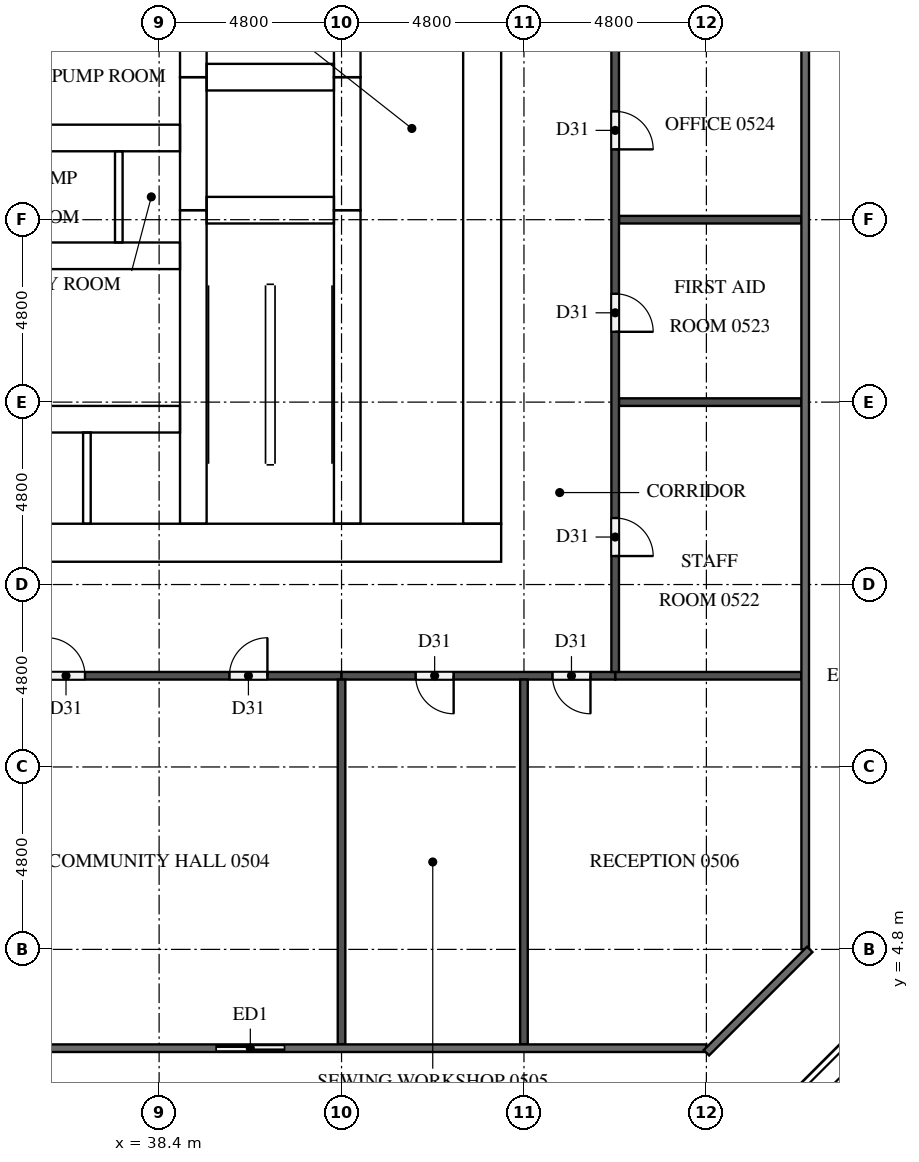
"""IFC4 building model, lengths in metres.
Left out: names, types, materials, properties, quantities, classifications, styles, units other than length and angle.
Written with IfcOpenShell. Run it as: python <this file> out.ifc"""

import sys

from ifc_helpers import new_model, si_unit, direction, frame, frame_2d, origin, place, context, subcontext, project, spatial, rectangle, extrude, element, fill, save


model = new_model("IFC4")
c1 = context("Model", 3, precision=1e-05, world=origin(), true_north=direction((0.0, 1.0)))
c2 = subcontext(c1, "Body", "Model", "MODEL_VIEW")
j1 = project(units=[si_unit("LENGTHUNIT", "METRE"), si_unit("PLANEANGLEUNIT", "RADIAN")], contexts=[c1])
p1 = place(None, origin())
s1 = spatial("IfcSite", under=j1, at=p1, CompositionType="ELEMENT")
p2 = place(p1, origin())
s2 = spatial("IfcBuilding", under=s1, at=p2, CompositionType="ELEMENT")
p3 = place(p2, frame((0.0, 0.0, 24.0)))
s3 = spatial("IfcBuildingStorey", under=s2, at=p3, CompositionType="ELEMENT", Elevation=24.0)
p4 = place(p3, frame((15.0, 15.5, 0.0), z_axis=(0.0, 0.0, 1.0), x_axis=(1.0, 0.0, 0.0)))
e1 = element("IfcWall", 1, at=p4, inside=s3, PredefinedType="SHEAR", context=c2, shape_type="SweptSolid", body=[
    extrude(rectangle(XDim=32.4, YDim=1.0, at=frame_2d((16.2, 0.0))), origin(), (0.0, 0.0, 1.0), 5.1),
])
p5 = place(p4, frame((15.3, 0.0, 0.0)))
e2 = element("IfcOpeningElement", 2, at=p5, cuts=e1, PredefinedType="OPENING", context=c2, shape_type="SweptSolid", body=[
    extrude(rectangle(XDim=1.8, YDim=2.1, at=frame_2d((0.9, 1.05))), frame((0.0, 0.51, 0.0), z_axis=(0.0, -1.0, 0.0), x_axis=(1.0, 0.0, 0.0)), (0.0, 0.0, 1.0), 1.02),
])
p6 = place(p3, frame((46.9, 16.0, 0.0), z_axis=(0.0, 0.0, 1.0), x_axis=(0.0, 1.0, 0.0)))
e3 = element("IfcWall", 3, at=p6, inside=s3, PredefinedType="SHEAR", context=c2, shape_type="SweptSolid", body=[
    extrude(rectangle(XDim=20.8, YDim=1.0, at=frame_2d((10.4, 0.0))), origin(), (0.0, 0.0, 1.0), 5.1),
])
p7 = place(p6, frame((10.1, 0.0, 0.0)))
e4 = element("IfcOpeningElement", 4, at=p7, cuts=e3, PredefinedType="OPENING", context=c2, shape_type="SweptSolid", body=[
    extrude(rectangle(XDim=1.2, YDim=2.1, at=frame_2d((0.6, 1.05))), frame((0.0, 0.51, 0.0), z_axis=(0.0, -1.0, 0.0), x_axis=(1.0, 0.0, 0.0)), (0.0, 0.0, 1.0), 1.02),
])
p8 = place(p3, frame((39.3, 16.0, 0.0), z_axis=(0.0, 0.0, 1.0), x_axis=(0.0, 1.0, 0.0)))
e5 = element("IfcWall", 5, at=p8, inside=s3, PredefinedType="SHEAR", context=c2, shape_type="SweptSolid", body=[
    extrude(rectangle(XDim=8.25, YDim=0.7, at=frame_2d((4.125, 0.0))), origin(), (0.0, 0.0, 1.0), 5.1),
])
p9 = place(p3, frame((39.3, 24.25, 0.0), z_axis=(0.0, 0.0, 1.0), x_axis=(0.0, 1.0, 0.0)))
e6 = element("IfcWall", 6, at=p9, inside=s3, PredefinedType="SHEAR", context=c2, shape_type="SweptSolid", body=[
    extrude(rectangle(XDim=3.5, YDim=0.7, at=frame_2d((1.75, 0.0))), origin(), (0.0, 0.0, 1.0), 5.1),
])
p10 = place(p3, frame((39.3, 27.75, 0.0), z_axis=(0.0, 0.0, 1.0), x_axis=(0.0, 1.0, 0.0)))
e7 = element("IfcWall", 7, at=p10, inside=s3, PredefinedType="SHEAR", context=c2, shape_type="SweptSolid", body=[
    extrude(rectangle(XDim=9.05, YDim=0.7, at=frame_2d((4.525, 0.0))), origin(), (0.0, 0.0, 1.0), 5.1),
])
p11 = place(p3, frame((43.35, 16.0, 0.0), z_axis=(0.0, 0.0, 1.0), x_axis=(0.0, 1.0, 0.0)))
e8 = element("IfcWall", 8, at=p11, inside=s3, PredefinedType="SHEAR", context=c2, shape_type="SweptSolid", body=[
    extrude(rectangle(XDim=8.25, YDim=0.7, at=frame_2d((4.125, 0.0))), origin(), (0.0, 0.0, 1.0), 5.1),
])
p12 = place(p11, frame((0.2, 0.0, 0.0)))
e9 = element("IfcOpeningElement", 9, at=p12, cuts=e8, PredefinedType="OPENING", context=c2, shape_type="SweptSolid", body=[
    extrude(rectangle(XDim=1.2, YDim=2.1, at=frame_2d((0.6, 1.05))), frame((0.0, 0.36, 0.0), z_axis=(0.0, -1.0, 0.0), x_axis=(1.0, 0.0, 0.0)), (0.0, 0.0, 1.0), 0.72),
])
p13 = place(p3, frame((43.35, 24.25, 0.0), z_axis=(0.0, 0.0, 1.0), x_axis=(0.0, 1.0, 0.0)))
e10 = element("IfcWall", 10, at=p13, inside=s3, PredefinedType="SHEAR", context=c2, shape_type="SweptSolid", body=[
    extrude(rectangle(XDim=3.5, YDim=0.7, at=frame_2d((1.75, 0.0))), origin(), (0.0, 0.0, 1.0), 5.1),
])
p14 = place(p13, frame((1.2, 0.0, 0.0)))
e11 = element("IfcOpeningElement", 11, at=p14, cuts=e10, PredefinedType="OPENING", context=c2, shape_type="SweptSolid", body=[
    extrude(rectangle(XDim=1.1, YDim=2.1, at=frame_2d((0.55, 1.05))), frame((0.0, 0.36, 0.0), z_axis=(0.0, -1.0, 0.0), x_axis=(1.0, 0.0, 0.0)), (0.0, 0.0, 1.0), 0.72),
])
p15 = place(p3, frame((43.35, 27.75, 0.0), z_axis=(0.0, 0.0, 1.0), x_axis=(0.0, 1.0, 0.0)))
e12 = element("IfcWall", 12, at=p15, inside=s3, PredefinedType="SHEAR", context=c2, shape_type="SweptSolid", body=[
    extrude(rectangle(XDim=9.05, YDim=0.7, at=frame_2d((4.525, 0.0))), origin(), (0.0, 0.0, 1.0), 5.1),
])
p16 = place(p15, frame((7.65, 0.0, 0.0)))
e13 = element("IfcOpeningElement", 13, at=p16, cuts=e12, PredefinedType="OPENING", context=c2, shape_type="SweptSolid", body=[
    extrude(rectangle(XDim=1.2, YDim=2.1, at=frame_2d((0.6, 1.05))), frame((0.0, 0.36, 0.0), z_axis=(0.0, -1.0, 0.0), x_axis=(1.0, 0.0, 0.0)), (0.0, 0.0, 1.0), 0.72),
])
for number, where, z_axis, x_axis in (
    (14, (39.65, 24.25, 0.0), (0.0, 0.0, 1.0), (1.0, 0.0, 0.0)),
    (15, (39.65, 27.75, 0.0), (0.0, 0.0, 1.0), (1.0, 0.0, 0.0)),
):
    element("IfcWall", number, at=place(p3, frame(where, z_axis=z_axis, x_axis=x_axis)), inside=s3, PredefinedType="SHEAR", context=c2, shape_type="SweptSolid", body=[
        extrude(rectangle(XDim=3.35, YDim=0.7, at=frame_2d((1.675, 0.0))), origin(), (0.0, 0.0, 1.0), 5.1),
    ])
p17 = place(p3, frame((33.35, 18.75, 0.0), z_axis=(0.0, 0.0, 1.0), x_axis=(1.0, 0.0, 0.0)))
e16 = element("IfcWall", 16, at=p17, inside=s3, PredefinedType="SHEAR", context=c2, shape_type="SweptSolid", body=[
    extrude(rectangle(XDim=5.6, YDim=0.7, at=frame_2d((2.8, 0.0))), origin(), (0.0, 0.0, 1.0), 5.1),
])
p18 = place(p17, frame((1.325, 0.0, 0.0)))
e17 = element("IfcOpeningElement", 17, at=p18, cuts=e16, PredefinedType="OPENING", context=c2, shape_type="SweptSolid", body=[
    extrude(rectangle(XDim=1.1, YDim=2.1, at=frame_2d((0.55, 1.05))), frame((0.0, 0.36, 0.0), z_axis=(0.0, -1.0, 0.0), x_axis=(1.0, 0.0, 0.0)), (0.0, 0.0, 1.0), 0.72),
])
p19 = place(p17, frame((3.875, 0.0, 0.0)))
e18 = element("IfcOpeningElement", 18, at=p19, cuts=e16, PredefinedType="OPENING", context=c2, shape_type="SweptSolid", body=[
    extrude(rectangle(XDim=1.1, YDim=2.1, at=frame_2d((0.55, 1.05))), frame((0.0, 0.36, 0.0), z_axis=(0.0, -1.0, 0.0), x_axis=(1.0, 0.0, 0.0)), (0.0, 0.0, 1.0), 0.72),
])
p20 = place(p3, frame((23.45, 23.05, 0.0), z_axis=(0.0, 0.0, 1.0), x_axis=(1.0, 0.0, 0.0)))
e19 = element("IfcWall", 19, at=p20, inside=s3, PredefinedType="SHEAR", context=c2, shape_type="SweptSolid", body=[
    extrude(rectangle(XDim=15.5, YDim=0.7, at=frame_2d((7.75, 0.0))), origin(), (0.0, 0.0, 1.0), 5.1),
])
p21 = place(p20, frame((0.658, 0.0, 0.0)))
e20 = element("IfcOpeningElement", 20, at=p21, cuts=e19, PredefinedType="OPENING", context=c2, shape_type="SweptSolid", body=[
    extrude(rectangle(XDim=1.1, YDim=2.1, at=frame_2d((0.55, 1.05))), frame((0.0, 0.36, 0.0), z_axis=(0.0, -1.0, 0.0), x_axis=(1.0, 0.0, 0.0)), (0.0, 0.0, 1.0), 0.72),
])
p22 = place(p20, frame((3.275, 0.0, 0.0)))
e21 = element("IfcOpeningElement", 21, at=p22, cuts=e19, PredefinedType="OPENING", context=c2, shape_type="SweptSolid", body=[
    extrude(rectangle(XDim=1.1, YDim=2.1, at=frame_2d((0.55, 1.05))), frame((0.0, 0.36, 0.0), z_axis=(0.0, -1.0, 0.0), x_axis=(1.0, 0.0, 0.0)), (0.0, 0.0, 1.0), 0.72),
])
p23 = place(p20, frame((11.628, 0.0, 0.0)))
e22 = element("IfcOpeningElement", 22, at=p23, cuts=e19, PredefinedType="OPENING", context=c2, shape_type="SweptSolid", body=[
    extrude(rectangle(XDim=1.0, YDim=2.1, at=frame_2d((0.5, 1.05))), frame((0.0, 0.36, 0.0), z_axis=(0.0, -1.0, 0.0), x_axis=(1.0, 0.0, 0.0)), (0.0, 0.0, 1.0), 0.72),
])
p24 = place(p20, frame((14.245, 0.0, 0.0)))
e23 = element("IfcOpeningElement", 23, at=p24, cuts=e19, PredefinedType="OPENING", context=c2, shape_type="SweptSolid", body=[
    extrude(rectangle(XDim=1.0, YDim=2.1, at=frame_2d((0.5, 1.05))), frame((0.0, 0.36, 0.0), z_axis=(0.0, -1.0, 0.0), x_axis=(1.0, 0.0, 0.0)), (0.0, 0.0, 1.0), 0.72),
])
p25 = place(p3, frame((23.45, 26.15, 0.0), z_axis=(0.0, 0.0, 1.0), x_axis=(1.0, 0.0, 0.0)))
e24 = element("IfcWall", 24, at=p25, inside=s3, PredefinedType="SHEAR", context=c2, shape_type="SweptSolid", body=[
    extrude(rectangle(XDim=15.5, YDim=0.7, at=frame_2d((7.75, 0.0))), origin(), (0.0, 0.0, 1.0), 5.1),
])
p26 = place(p3, frame((39.6, 2.2, 0.0), z_axis=(0.0, 0.0, 1.0), x_axis=(1.0, 0.0, 0.0)))
e25 = element("IfcWall", 25, at=p26, inside=s3, PredefinedType="SOLIDWALL", context=c2, shape_type="SweptSolid", body=[
    extrude(rectangle(XDim=2.4, YDim=0.15, at=frame_2d((1.2, 0.0))), origin(), (0.0, 0.0, 1.0), 5.1),
])
p27 = place(p26, frame((0.3, 0.0, 0.0)))
e26 = element("IfcOpeningElement", 26, at=p27, cuts=e25, PredefinedType="OPENING", context=c2, shape_type="SweptSolid", body=[
    extrude(rectangle(XDim=1.8, YDim=2.4, at=frame_2d((0.9, 1.2))), frame((0.0, 0.085, 0.0), z_axis=(0.0, -1.0, 0.0), x_axis=(1.0, 0.0, 0.0)), (0.0, 0.0, 1.0), 0.17),
])
p28 = place(p3, frame((36.5, 16.0, 0.0), z_axis=(0.0, 0.0, 1.0), x_axis=(0.0, 1.0, 0.0)))
e27 = element("IfcWall", 27, at=p28, inside=s3, PredefinedType="SOLIDWALL", context=c2, shape_type="SweptSolid", body=[
    extrude(rectangle(XDim=2.4, YDim=0.2, at=frame_2d((1.2, 0.0))), origin(), (0.0, 0.0, 1.0), 5.1),
])
p29 = place(p3, frame((37.339, 23.4, 0.0), z_axis=(0.0, 0.0, 1.0), x_axis=(0.0, 1.0, 0.0)))
e28 = element("IfcWall", 28, at=p29, inside=s3, PredefinedType="PARTITIONING", context=c2, shape_type="SweptSolid", body=[
    extrude(rectangle(XDim=2.4, YDim=0.2, at=frame_2d((1.2, 0.0))), origin(), (0.0, 0.0, 1.0), 5.1),
])
p30 = place(p3, frame((50.4, 12.0, 0.0), z_axis=(0.0, 0.0, 1.0), x_axis=(1.0, 0.0, 0.0)))
e29 = element("IfcWall", 29, at=p30, inside=s3, PredefinedType="PARTITIONING", context=c2, shape_type="SweptSolid", body=[
    extrude(rectangle(XDim=4.9, YDim=0.2, at=frame_2d((2.45, 0.0))), origin(), (0.0, 0.0, 1.0), 5.1),
])
p31 = place(p3, frame((33.6, 12.0, 0.0), z_axis=(0.0, 0.0, 1.0), x_axis=(1.0, 0.0, 0.0)))
e30 = element("IfcWall", 30, at=p31, inside=s3, PredefinedType="PARTITIONING", context=c2, shape_type="SweptSolid", body=[
    extrude(rectangle(XDim=9.6, YDim=0.2, at=frame_2d((4.8, 0.0))), origin(), (0.0, 0.0, 1.0), 5.1),
])
p32 = place(p31, frame((6.65, 0.0, 0.0)))
e31 = element("IfcOpeningElement", 31, at=p32, cuts=e30, PredefinedType="OPENING", context=c2, shape_type="SweptSolid", body=[
    extrude(rectangle(XDim=1.0, YDim=2.1, at=frame_2d((0.5, 1.05))), frame((0.0, 0.11, 0.0), z_axis=(0.0, -1.0, 0.0), x_axis=(1.0, 0.0, 0.0)), (0.0, 0.0, 1.0), 0.22),
])
p33 = place(p31, frame((1.85, 0.0, 0.0)))
e32 = element("IfcOpeningElement", 32, at=p33, cuts=e30, PredefinedType="OPENING", context=c2, shape_type="SweptSolid", body=[
    extrude(rectangle(XDim=1.0, YDim=2.1, at=frame_2d((0.5, 1.05))), frame((0.0, 0.11, 0.0), z_axis=(0.0, -1.0, 0.0), x_axis=(1.0, 0.0, 0.0)), (0.0, 0.0, 1.0), 0.22),
])
p34 = place(p3, frame((50.4, 12.0, 0.0), z_axis=(0.0, 0.0, 1.0), x_axis=(-1.0, 0.0, 0.0)))
e33 = element("IfcWall", 33, at=p34, inside=s3, PredefinedType="PARTITIONING", context=c2, shape_type="SweptSolid", body=[
    extrude(rectangle(XDim=7.2, YDim=0.2, at=frame_2d((3.6, 0.0))), origin(), (0.0, 0.0, 1.0), 5.1),
])
p35 = place(p34, frame((4.25, 0.0, 0.0)))
e34 = element("IfcOpeningElement", 34, at=p35, cuts=e33, PredefinedType="OPENING", context=c2, shape_type="SweptSolid", body=[
    extrude(rectangle(XDim=1.0, YDim=2.1, at=frame_2d((0.5, 1.05))), frame((0.0, 0.11, 0.0), z_axis=(0.0, -1.0, 0.0), x_axis=(1.0, 0.0, 0.0)), (0.0, 0.0, 1.0), 0.22),
])
p36 = place(p34, frame((0.65, 0.0, 0.0)))
e35 = element("IfcOpeningElement", 35, at=p36, cuts=e33, PredefinedType="OPENING", context=c2, shape_type="SweptSolid", body=[
    extrude(rectangle(XDim=1.0, YDim=2.1, at=frame_2d((0.5, 1.05))), frame((0.0, 0.11, 0.0), z_axis=(0.0, -1.0, 0.0), x_axis=(1.0, 0.0, 0.0)), (0.0, 0.0, 1.0), 0.22),
])
for number, where, z_axis, x_axis in (
    (36, (50.5, 19.2, 0.0), (0.0, 0.0, 1.0), (1.0, 0.0, 0.0)),
    (37, (50.5, 24.0, 0.0), (0.0, 0.0, 1.0), (1.0, 0.0, 0.0)),
):
    element("IfcWall", number, at=place(p3, frame(where, z_axis=z_axis, x_axis=x_axis)), inside=s3, PredefinedType="PARTITIONING", context=c2, shape_type="SweptSolid", body=[
        extrude(rectangle(XDim=4.8, YDim=0.2, at=frame_2d((2.4, 0.0))), origin(), (0.0, 0.0, 1.0), 5.1),
    ])
for number, where, z_axis, x_axis in (
    (38, (43.2, 2.3, 0.0), (0.0, 0.0, 1.0), (0.0, 1.0, 0.0)),
    (39, (48.0, 2.3, 0.0), (0.0, 0.0, 1.0), (0.0, 1.0, 0.0)),
):
    element("IfcWall", number, at=place(p3, frame(where, z_axis=z_axis, x_axis=x_axis)), inside=s3, PredefinedType="PARTITIONING", context=c2, shape_type="SweptSolid", body=[
        extrude(rectangle(XDim=9.6, YDim=0.2, at=frame_2d((4.8, 0.0))), origin(), (0.0, 0.0, 1.0), 5.1),
    ])
p37 = place(p3, frame((50.4, 40.7, 0.0), z_axis=(0.0, 0.0, 1.0), x_axis=(0.0, -1.0, 0.0)))
e40 = element("IfcWall", 40, at=p37, inside=s3, PredefinedType="PARTITIONING", context=c2, shape_type="SweptSolid", body=[
    extrude(rectangle(XDim=28.6, YDim=0.2, at=frame_2d((14.3, 0.0))), origin(), (0.0, 0.0, 1.0), 5.1),
])
p38 = place(p37, frame((24.55, 0.0, 0.0)))
e41 = element("IfcOpeningElement", 41, at=p38, cuts=e40, PredefinedType="OPENING", context=c2, shape_type="SweptSolid", body=[
    extrude(rectangle(XDim=1.0, YDim=2.1, at=frame_2d((0.5, 1.05))), frame((0.0, 0.11, 0.0), z_axis=(0.0, -1.0, 0.0), x_axis=(1.0, 0.0, 0.0)), (0.0, 0.0, 1.0), 0.22),
])
p39 = place(p37, frame((18.65, 0.0, 0.0)))
e42 = element("IfcOpeningElement", 42, at=p39, cuts=e40, PredefinedType="OPENING", context=c2, shape_type="SweptSolid", body=[
    extrude(rectangle(XDim=1.0, YDim=2.1, at=frame_2d((0.5, 1.05))), frame((0.0, 0.11, 0.0), z_axis=(0.0, -1.0, 0.0), x_axis=(1.0, 0.0, 0.0)), (0.0, 0.0, 1.0), 0.22),
])
p40 = place(p37, frame((13.85, 0.0, 0.0)))
e43 = element("IfcOpeningElement", 43, at=p40, cuts=e40, PredefinedType="OPENING", context=c2, shape_type="SweptSolid", body=[
    extrude(rectangle(XDim=1.0, YDim=2.1, at=frame_2d((0.5, 1.05))), frame((0.0, 0.11, 0.0), z_axis=(0.0, -1.0, 0.0), x_axis=(1.0, 0.0, 0.0)), (0.0, 0.0, 1.0), 0.22),
])
p41 = place(p37, frame((9.05, 0.0, 0.0)))
e44 = element("IfcOpeningElement", 44, at=p41, cuts=e40, PredefinedType="OPENING", context=c2, shape_type="SweptSolid", body=[
    extrude(rectangle(XDim=1.0, YDim=2.1, at=frame_2d((0.5, 1.05))), frame((0.0, 0.11, 0.0), z_axis=(0.0, -1.0, 0.0), x_axis=(1.0, 0.0, 0.0)), (0.0, 0.0, 1.0), 0.22),
])
p42 = place(p37, frame((3.05, 0.0, 0.0)))
e45 = element("IfcOpeningElement", 45, at=p42, cuts=e40, PredefinedType="OPENING", context=c2, shape_type="SweptSolid", body=[
    extrude(rectangle(XDim=1.0, YDim=2.1, at=frame_2d((0.5, 1.05))), frame((0.0, 0.11, 0.0), z_axis=(0.0, -1.0, 0.0), x_axis=(1.0, 0.0, 0.0)), (0.0, 0.0, 1.0), 0.22),
])
p43 = place(p27, origin())
e46 = element("IfcDoor", 46, at=p43, inside=s3, OperationType="SLIDING_TO_RIGHT", PredefinedType="DOOR", context=c2, shape_type="SweptSolid", body=[
    extrude(rectangle(XDim=1.8, YDim=2.4, at=frame_2d((0.9, 1.2))), frame((0.0, 0.025, 0.0), z_axis=(0.0, -1.0, 0.0), x_axis=(1.0, 0.0, 0.0)), (0.0, 0.0, 1.0), 0.05),
])
fill(e26, e46)
p44 = place(p18, origin())
e47 = element("IfcDoor", 47, at=p44, inside=s3, OperationType="DOUBLE_DOOR_SLIDING", PredefinedType="DOOR", context=c2, shape_type="SweptSolid", body=[
    extrude(rectangle(XDim=1.1, YDim=2.1, at=frame_2d((0.55, 1.05))), frame((0.0, 0.025, 0.0), z_axis=(0.0, -1.0, 0.0), x_axis=(1.0, 0.0, 0.0)), (0.0, 0.0, 1.0), 0.05),
])
fill(e17, e47)
p45 = place(p19, origin())
e48 = element("IfcDoor", 48, at=p45, inside=s3, OperationType="DOUBLE_DOOR_SLIDING", PredefinedType="DOOR", context=c2, shape_type="SweptSolid", body=[
    extrude(rectangle(XDim=1.1, YDim=2.1, at=frame_2d((0.55, 1.05))), frame((0.0, 0.025, 0.0), z_axis=(0.0, -1.0, 0.0), x_axis=(1.0, 0.0, 0.0)), (0.0, 0.0, 1.0), 0.05),
])
fill(e18, e48)
p46 = place(p14, origin())
e49 = element("IfcDoor", 49, at=p46, inside=s3, OperationType="DOUBLE_DOOR_SLIDING", PredefinedType="DOOR", context=c2, shape_type="SweptSolid", body=[
    extrude(rectangle(XDim=1.1, YDim=2.1, at=frame_2d((0.55, 1.05))), frame((0.0, 0.025, 0.0), z_axis=(0.0, -1.0, 0.0), x_axis=(1.0, 0.0, 0.0)), (0.0, 0.0, 1.0), 0.05),
])
fill(e11, e49)
p47 = place(p12, origin())
e50 = element("IfcDoor", 50, at=p47, inside=s3, OperationType="SINGLE_SWING_RIGHT", PredefinedType="DOOR", context=c2, shape_type="SweptSolid", body=[
    extrude(rectangle(XDim=1.2, YDim=2.1, at=frame_2d((0.6, 1.05))), frame((0.0, 0.025, 0.0), z_axis=(0.0, -1.0, 0.0), x_axis=(1.0, 0.0, 0.0)), (0.0, 0.0, 1.0), 0.05),
])
fill(e9, e50)
p48 = place(p7, origin())
e51 = element("IfcDoor", 51, at=p48, inside=s3, OperationType="SINGLE_SWING_LEFT", PredefinedType="DOOR", context=c2, shape_type="SweptSolid", body=[
    extrude(rectangle(XDim=1.2, YDim=2.1, at=frame_2d((0.6, 1.05))), frame((0.0, 0.025, 0.0), z_axis=(0.0, -1.0, 0.0), x_axis=(1.0, 0.0, 0.0)), (0.0, 0.0, 1.0), 0.05),
])
fill(e4, e51)
p49 = place(p23, frame((1.0, 0.0, 0.0), z_axis=(0.0, 0.0, 1.0), x_axis=(-1.0, 0.0, 0.0)))
e52 = element("IfcDoor", 52, at=p49, inside=s3, OperationType="SINGLE_SWING_RIGHT", PredefinedType="DOOR", context=c2, shape_type="SweptSolid", body=[
    extrude(rectangle(XDim=1.0, YDim=2.1, at=frame_2d((0.5, 1.05))), frame((0.0, 0.025, 0.0), z_axis=(0.0, -1.0, 0.0), x_axis=(1.0, 0.0, 0.0)), (0.0, 0.0, 1.0), 0.05),
])
fill(e22, e52)
p50 = place(p24, frame((1.0, 0.0, 0.0), z_axis=(0.0, 0.0, 1.0), x_axis=(-1.0, 0.0, 0.0)))
e53 = element("IfcDoor", 53, at=p50, inside=s3, OperationType="SINGLE_SWING_LEFT", PredefinedType="DOOR", context=c2, shape_type="SweptSolid", body=[
    extrude(rectangle(XDim=1.0, YDim=2.1, at=frame_2d((0.5, 1.05))), frame((0.0, 0.025, 0.0), z_axis=(0.0, -1.0, 0.0), x_axis=(1.0, 0.0, 0.0)), (0.0, 0.0, 1.0), 0.05),
])
fill(e23, e53)
p51 = place(p32, origin())
e54 = element("IfcDoor", 54, at=p51, inside=s3, OperationType="SINGLE_SWING_RIGHT", PredefinedType="DOOR", context=c2, shape_type="SweptSolid", body=[
    extrude(rectangle(XDim=1.0, YDim=2.1, at=frame_2d((0.5, 1.05))), frame((0.0, 0.025, 0.0), z_axis=(0.0, -1.0, 0.0), x_axis=(1.0, 0.0, 0.0)), (0.0, 0.0, 1.0), 0.05),
])
fill(e31, e54)
p52 = place(p33, origin())
e55 = element("IfcDoor", 55, at=p52, inside=s3, OperationType="SINGLE_SWING_LEFT", PredefinedType="DOOR", context=c2, shape_type="SweptSolid", body=[
    extrude(rectangle(XDim=1.0, YDim=2.1, at=frame_2d((0.5, 1.05))), frame((0.0, 0.025, 0.0), z_axis=(0.0, -1.0, 0.0), x_axis=(1.0, 0.0, 0.0)), (0.0, 0.0, 1.0), 0.05),
])
fill(e32, e55)
p53 = place(p35, origin())
e56 = element("IfcDoor", 56, at=p53, inside=s3, OperationType="SINGLE_SWING_LEFT", PredefinedType="DOOR", context=c2, shape_type="SweptSolid", body=[
    extrude(rectangle(XDim=1.0, YDim=2.1, at=frame_2d((0.5, 1.05))), frame((0.0, 0.025, 0.0), z_axis=(0.0, -1.0, 0.0), x_axis=(1.0, 0.0, 0.0)), (0.0, 0.0, 1.0), 0.05),
])
fill(e34, e56)
p54 = place(p36, origin())
e57 = element("IfcDoor", 57, at=p54, inside=s3, OperationType="SINGLE_SWING_LEFT", PredefinedType="DOOR", context=c2, shape_type="SweptSolid", body=[
    extrude(rectangle(XDim=1.0, YDim=2.1, at=frame_2d((0.5, 1.05))), frame((0.0, 0.025, 0.0), z_axis=(0.0, -1.0, 0.0), x_axis=(1.0, 0.0, 0.0)), (0.0, 0.0, 1.0), 0.05),
])
fill(e35, e57)
p55 = place(p38, origin())
e58 = element("IfcDoor", 58, at=p55, inside=s3, OperationType="SINGLE_SWING_RIGHT", PredefinedType="DOOR", context=c2, shape_type="SweptSolid", body=[
    extrude(rectangle(XDim=1.0, YDim=2.1, at=frame_2d((0.5, 1.05))), frame((0.0, 0.025, 0.0), z_axis=(0.0, -1.0, 0.0), x_axis=(1.0, 0.0, 0.0)), (0.0, 0.0, 1.0), 0.05),
])
fill(e41, e58)
p56 = place(p39, origin())
e59 = element("IfcDoor", 59, at=p56, inside=s3, OperationType="SINGLE_SWING_RIGHT", PredefinedType="DOOR", context=c2, shape_type="SweptSolid", body=[
    extrude(rectangle(XDim=1.0, YDim=2.1, at=frame_2d((0.5, 1.05))), frame((0.0, 0.025, 0.0), z_axis=(0.0, -1.0, 0.0), x_axis=(1.0, 0.0, 0.0)), (0.0, 0.0, 1.0), 0.05),
])
fill(e42, e59)
p57 = place(p40, origin())
e60 = element("IfcDoor", 60, at=p57, inside=s3, OperationType="SINGLE_SWING_RIGHT", PredefinedType="DOOR", context=c2, shape_type="SweptSolid", body=[
    extrude(rectangle(XDim=1.0, YDim=2.1, at=frame_2d((0.5, 1.05))), frame((0.0, 0.025, 0.0), z_axis=(0.0, -1.0, 0.0), x_axis=(1.0, 0.0, 0.0)), (0.0, 0.0, 1.0), 0.05),
])
fill(e43, e60)
save(model, sys.argv[1])
